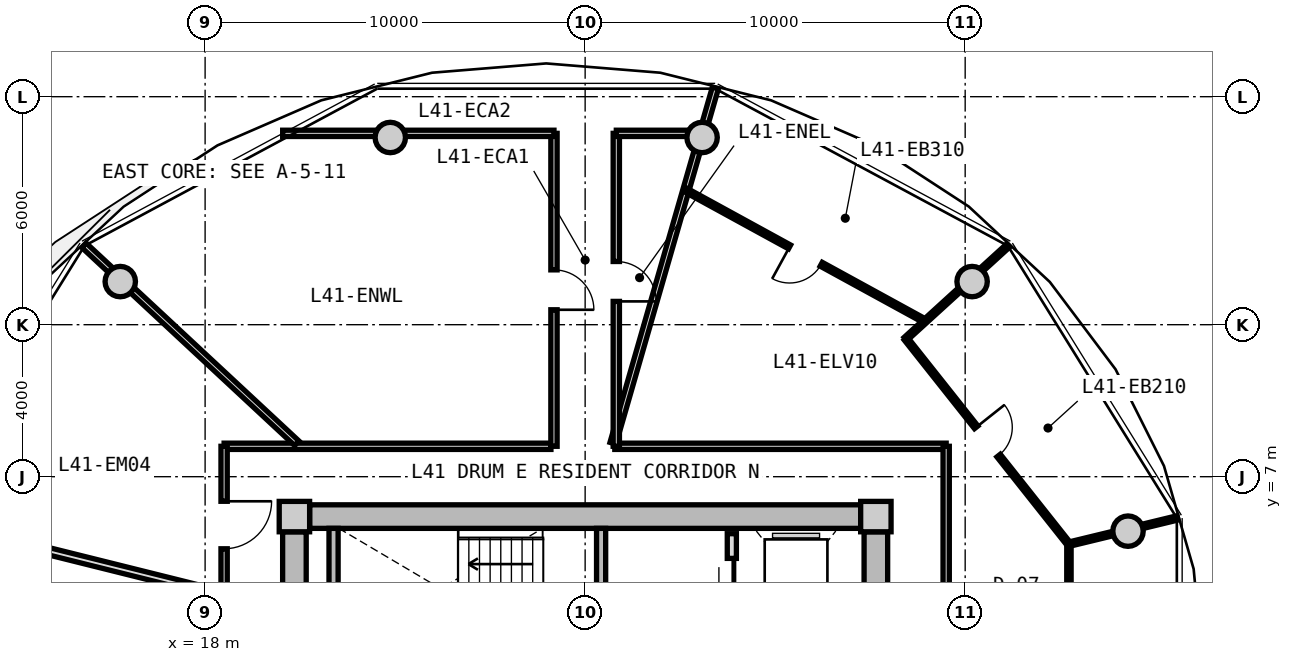
"""IFC4 building model, lengths in metres.
Left out: names, types, materials, properties, quantities, classifications, styles, units other than length and angle.
Written with IfcOpenShell. Run it as: python <this file> out.ifc"""

import sys

from ifc_helpers import new_model, si_unit, direction, frame, frame_2d, origin, origin_2d, place, context, subcontext, project, spatial, rectangle, circle, extrude, source, transform, mapped, element, fill, save


model = new_model("IFC4")
c1 = context("Model", 3, precision=1e-05, world=origin(), true_north=direction((0.0, 1.0)))
c2 = subcontext(c1, "Body", "Model", "MODEL_VIEW")
j1 = project(units=[si_unit("LENGTHUNIT", "METRE"), si_unit("PLANEANGLEUNIT", "RADIAN")], contexts=[c1])
p1 = place(None, origin())
s1 = spatial("IfcSite", under=j1, at=p1, CompositionType="ELEMENT")
p2 = place(p1, origin())
s2 = spatial("IfcBuilding", under=s1, at=p2, CompositionType="ELEMENT")
p3 = place(p2, frame((0.0, 0.0, 134.3)))
s3 = spatial("IfcBuildingStorey", under=s2, at=p3, CompositionType="ELEMENT", Elevation=134.3)
m1 = source(origin(), c2, "Body", "SweptSolid", [
    extrude(rectangle(XDim=0.8, YDim=0.8, at=origin_2d()), origin(), (0.0, 0.0, 1.0), 3.05),
])
for number, where, z_axis, x_axis in (
    (1, (35.65, 5.95, 0.0), (0.0, 0.0, 1.0), (1.0, 0.0, 0.0)),
    (2, (20.35, 5.95, 0.0), (0.0, 0.0, 1.0), (1.0, 0.0, 0.0)),
):
    element("IfcColumn", number, at=place(p3, frame(where, z_axis=z_axis, x_axis=x_axis)), inside=s3, PredefinedType="COLUMN", context=c2, shape_type="MappedRepresentation", body=[
        mapped(m1, transform((0.0, 0.0, 0.0), x_axis=(1.0, 0.0, 0.0), y_axis=(0.0, 1.0, 0.0), z_axis=(0.0, 0.0, 1.0), scale=1.0)),
    ])
m2 = source(origin(), c2, "Body", "SweptSolid", [
    extrude(rectangle(XDim=14.5, YDim=0.62, at=frame_2d((7.25, 0.0))), origin(), (0.0, 0.0, 1.0), 2.81),
])
p4 = place(p3, frame((20.75, 5.95, 0.0), z_axis=(0.0, 0.0, 1.0), x_axis=(1.0, 0.0, 0.0)))
e3 = element("IfcWall", 3, at=p4, inside=s3, PredefinedType="SHEAR", context=c2, shape_type="MappedRepresentation", body=[
    mapped(m2, transform((0.0, 0.0, 0.0), x_axis=(1.0, 0.0, 0.0), y_axis=(0.0, 1.0, 0.0), z_axis=(0.0, 0.0, 1.0), scale=1.0)),
])
m3 = source(origin(), c2, "Body", "SweptSolid", [
    extrude(rectangle(XDim=11.1, YDim=0.62, at=frame_2d((5.55, 0.0))), origin(), (0.0, 0.0, 1.0), 2.81),
])
p5 = place(p3, frame((20.35, -5.55, 0.0), z_axis=(0.0, 0.0, 1.0), x_axis=(0.0, 1.0, 0.0)))
e4 = element("IfcWall", 4, at=p5, inside=s3, PredefinedType="SHEAR", context=c2, shape_type="MappedRepresentation", body=[
    mapped(m3, transform((0.0, 0.0, 0.0), x_axis=(1.0, 0.0, 0.0), y_axis=(0.0, 1.0, 0.0), z_axis=(0.0, 0.0, 1.0), scale=1.0)),
])
p6 = place(p5, frame((3.8, 0.0, 0.0)))
e5 = element("IfcOpeningElement", 5, at=p6, cuts=e4, PredefinedType="OPENING", context=c2, shape_type="SweptSolid", body=[
    extrude(rectangle(XDim=1.2, YDim=2.15, at=frame_2d((0.6, 1.075))), frame((0.0, 0.32, 0.0), z_axis=(0.0, -1.0, 0.0), x_axis=(1.0, 0.0, 0.0)), (0.0, 0.0, 1.0), 0.64),
])
p7 = place(p3, frame((35.65, 5.55, 0.0), z_axis=(0.0, 0.0, 1.0), x_axis=(0.0, -1.0, 0.0)))
e6 = element("IfcWall", 6, at=p7, inside=s3, PredefinedType="SHEAR", context=c2, shape_type="MappedRepresentation", body=[
    mapped(m3, transform((0.0, 0.0, 0.0), x_axis=(1.0, 0.0, 0.0), y_axis=(0.0, 1.0, 0.0), z_axis=(0.0, 0.0, 1.0), scale=1.0)),
])
p8 = place(p7, frame((5.65, 0.0, 0.0)))
e7 = element("IfcOpeningElement", 7, at=p8, cuts=e6, PredefinedType="OPENING", context=c2, shape_type="SweptSolid", body=[
    extrude(rectangle(XDim=1.2, YDim=2.15, at=frame_2d((0.6, 1.075))), frame((0.0, 0.32, 0.0), z_axis=(0.0, -1.0, 0.0), x_axis=(1.0, 0.0, 0.0)), (0.0, 0.0, 1.0), 0.64),
])
p9 = place(p7, frame((9.3, 0.0, 0.0)))
e8 = element("IfcOpeningElement", 8, at=p9, cuts=e6, PredefinedType="OPENING", context=c2, shape_type="SweptSolid", body=[
    extrude(rectangle(XDim=1.0, YDim=2.1, at=frame_2d((0.5, 1.05))), frame((0.0, 0.32, 0.0), z_axis=(0.0, -1.0, 0.0), x_axis=(1.0, 0.0, 0.0)), (0.0, 0.0, 1.0), 0.64),
])
m4 = source(origin(), c2, "Body", "SweptSolid", [
    extrude(circle(Radius=0.4, at=origin_2d()), origin(), (0.0, 0.0, 1.0), 3.47),
])
for number, where, z_axis, x_axis in (
    (9, (42.285, 5.567, -0.42), (0.0, 0.0, 1.0), (1.0, 0.0, 0.0)),
    (10, (38.183, 12.135, -0.42), (0.0, 0.0, 1.0), (1.0, 0.0, 0.0)),
    (11, (31.077, 15.926, -0.42), (0.0, 0.0, 1.0), (1.0, 0.0, 0.0)),
    (12, (22.873, 15.926, -0.42), (0.0, 0.0, 1.0), (1.0, 0.0, 0.0)),
    (13, (15.767, 12.135, -0.42), (0.0, 0.0, 1.0), (1.0, 0.0, 0.0)),
):
    element("IfcColumn", number, at=place(p3, frame(where, z_axis=z_axis, x_axis=x_axis)), inside=s3, PredefinedType="COLUMN", context=c2, shape_type="MappedRepresentation", body=[
        mapped(m4, transform((0.0, 0.0, 0.0), x_axis=(1.0, 0.0, 0.0), y_axis=(0.0, 1.0, 0.0), z_axis=(0.0, 0.0, 1.0), scale=1.0)),
    ])
m5 = source(origin(), c2, "Body", "SweptSolid", [
    extrude(rectangle(XDim=3.19, YDim=0.24, at=frame_2d((1.595, 0.0))), origin(), (0.0, 0.0, 1.0), 2.81),
])
p10 = place(p3, frame((21.38, 2.45, 0.0), z_axis=(0.0, 0.0, 1.0), x_axis=(0.0, 1.0, 0.0)))
e14 = element("IfcWall", 14, at=p10, inside=s3, PredefinedType="PARTITIONING", context=c2, shape_type="MappedRepresentation", body=[
    mapped(m5, transform((0.0, 0.0, 0.0), x_axis=(1.0, 0.0, 0.0), y_axis=(0.0, 1.0, 0.0), z_axis=(0.0, 0.0, 1.0), scale=1.0)),
])
p11 = place(p3, frame((28.42, 2.45, 0.0), z_axis=(0.0, 0.0, 1.0), x_axis=(0.0, 1.0, 0.0)))
e15 = element("IfcWall", 15, at=p11, inside=s3, PredefinedType="PARTITIONING", context=c2, shape_type="MappedRepresentation", body=[
    mapped(m5, transform((0.0, 0.0, 0.0), x_axis=(1.0, 0.0, 0.0), y_axis=(0.0, 1.0, 0.0), z_axis=(0.0, 0.0, 1.0), scale=1.0)),
])
p12 = place(p11, frame((0.55, 0.0, 0.0)))
e16 = element("IfcOpeningElement", 16, at=p12, cuts=e15, PredefinedType="OPENING", context=c2, shape_type="SweptSolid", body=[
    extrude(rectangle(XDim=1.1, YDim=2.15, at=frame_2d((0.55, 1.075))), frame((0.0, 0.13, 0.0), z_axis=(0.0, -1.0, 0.0), x_axis=(1.0, 0.0, 0.0)), (0.0, 0.0, 1.0), 0.26),
])
m6 = source(origin(), c2, "Body", "SweptSolid", [
    extrude(rectangle(XDim=5.0, YDim=0.24, at=frame_2d((2.5, 0.0))), origin(), (0.0, 0.0, 1.0), 2.795),
])
p13 = place(p3, frame((31.86, 0.5, 0.0), z_axis=(0.0, 0.0, 1.0), x_axis=(0.0, 1.0, 0.0)))
e17 = element("IfcWall", 17, at=p13, inside=s3, PredefinedType="PARTITIONING", context=c2, shape_type="MappedRepresentation", body=[
    mapped(m6, transform((0.0, 0.0, 0.0), x_axis=(1.0, 0.0, 0.0), y_axis=(0.0, 1.0, 0.0), z_axis=(0.0, 0.0, 1.0), scale=1.0)),
])
p14 = place(p13, frame((3.05, 0.0, 0.0)))
e18 = element("IfcOpeningElement", 18, at=p14, cuts=e17, PredefinedType="OPENING", context=c2, shape_type="SweptSolid", body=[
    extrude(rectangle(XDim=1.3, YDim=2.2, at=frame_2d((0.65, 1.1))), frame((0.0, 0.13, 0.0), z_axis=(0.0, -1.0, 0.0), x_axis=(1.0, 0.0, 0.0)), (0.0, 0.0, 1.0), 0.26),
])
p15 = place(p13, frame((0.55, 0.0, 0.0)))
e19 = element("IfcOpeningElement", 19, at=p15, cuts=e17, PredefinedType="OPENING", context=c2, shape_type="SweptSolid", body=[
    extrude(rectangle(XDim=1.3, YDim=2.2, at=frame_2d((0.65, 1.1))), frame((0.0, 0.13, 0.0), z_axis=(0.0, -1.0, 0.0), x_axis=(1.0, 0.0, 0.0)), (0.0, 0.0, 1.0), 0.26),
])
m7 = source(origin(), c2, "Body", "SweptSolid", [
    extrude(rectangle(XDim=8.6, YDim=0.165, at=frame_2d((4.3, 0.0))), origin(), (0.0, 0.0, 1.0), 2.795),
])
p16 = place(p3, frame((18.5, 7.8, 0.0), z_axis=(0.0, 0.0, 1.0), x_axis=(1.0, 0.0, 0.0)))
e20 = element("IfcWall", 20, at=p16, inside=s3, PredefinedType="PARTITIONING", context=c2, shape_type="MappedRepresentation", body=[
    mapped(m7, transform((0.0, 0.0, 0.0), x_axis=(1.0, 0.0, 0.0), y_axis=(0.0, 1.0, 0.0), z_axis=(0.0, 0.0, 1.0), scale=1.0)),
])
m8 = source(origin(), c2, "Body", "SweptSolid", [
    extrude(rectangle(XDim=8.719, YDim=0.165, at=frame_2d((4.36, 0.0))), origin(), (0.0, 0.0, 1.0), 2.795),
])
p17 = place(p3, frame((28.781, 7.8, 0.0), z_axis=(0.0, 0.0, 1.0), x_axis=(1.0, 0.0, 0.0)))
e21 = element("IfcWall", 21, at=p17, inside=s3, PredefinedType="PARTITIONING", context=c2, shape_type="MappedRepresentation", body=[
    mapped(m8, transform((0.0, 0.0, 0.0), x_axis=(1.0, 0.0, 0.0), y_axis=(0.0, 1.0, 0.0), z_axis=(0.0, 0.0, 1.0), scale=1.0)),
])
m9 = source(origin(), c2, "Body", "SweptSolid", [
    extrude(rectangle(XDim=15.6, YDim=0.165, at=frame_2d((7.8, 0.0))), origin(), (0.0, 0.0, 1.0), 2.795),
])
p18 = place(p3, frame((18.5, -7.8, 0.0), z_axis=(0.0, 0.0, 1.0), x_axis=(0.0, 1.0, 0.0)))
e22 = element("IfcWall", 22, at=p18, inside=s3, PredefinedType="PARTITIONING", context=c2, shape_type="MappedRepresentation", body=[
    mapped(m9, transform((0.0, 0.0, 0.0), x_axis=(1.0, 0.0, 0.0), y_axis=(0.0, 1.0, 0.0), z_axis=(0.0, 0.0, 1.0), scale=1.0)),
])
p19 = place(p18, frame((12.903, 0.0, 0.0)))
e23 = element("IfcOpeningElement", 23, at=p19, cuts=e22, PredefinedType="OPENING", context=c2, shape_type="SweptSolid", body=[
    extrude(rectangle(XDim=1.25, YDim=2.2, at=frame_2d((0.625, 1.1))), frame((0.0, 0.093, 0.0), z_axis=(0.0, -1.0, 0.0), x_axis=(1.0, 0.0, 0.0)), (0.0, 0.0, 1.0), 0.185),
])
p20 = place(p18, frame((8.95, 0.0, 0.0)))
e24 = element("IfcOpeningElement", 24, at=p20, cuts=e22, PredefinedType="OPENING", context=c2, shape_type="SweptSolid", body=[
    extrude(rectangle(XDim=1.25, YDim=2.2, at=frame_2d((0.625, 1.1))), frame((0.0, 0.093, 0.0), z_axis=(0.0, -1.0, 0.0), x_axis=(1.0, 0.0, 0.0)), (0.0, 0.0, 1.0), 0.185),
])
p21 = place(p3, frame((37.5, 7.8, 0.0), z_axis=(0.0, 0.0, 1.0), x_axis=(0.0, -1.0, 0.0)))
e25 = element("IfcWall", 25, at=p21, inside=s3, PredefinedType="PARTITIONING", context=c2, shape_type="MappedRepresentation", body=[
    mapped(m9, transform((0.0, 0.0, 0.0), x_axis=(1.0, 0.0, 0.0), y_axis=(0.0, 1.0, 0.0), z_axis=(0.0, 0.0, 1.0), scale=1.0)),
])
p22 = place(p21, frame((5.687, 0.0, 0.0)))
e26 = element("IfcOpeningElement", 26, at=p22, cuts=e25, PredefinedType="OPENING", context=c2, shape_type="SweptSolid", body=[
    extrude(rectangle(XDim=1.05, YDim=2.15, at=frame_2d((0.525, 1.075))), frame((0.0, 0.093, 0.0), z_axis=(0.0, -1.0, 0.0), x_axis=(1.0, 0.0, 0.0)), (0.0, 0.0, 1.0), 0.185),
])
m10 = source(origin(), c2, "Body", "SweptSolid", [
    extrude(rectangle(XDim=9.73, YDim=0.165, at=frame_2d((4.865, 0.0))), origin(), (0.0, 0.0, 1.0), 2.345),
])
p23 = place(p3, frame((28.733, 7.88, 0.0), z_axis=(0.0, 0.0, 1.0), x_axis=(0.27679492614, 0.960929013436, 0.0)))
e27 = element("IfcWall", 27, at=p23, inside=s3, PredefinedType="PARTITIONING", context=c2, shape_type="MappedRepresentation", body=[
    mapped(m10, transform((0.0, 0.0, 0.0), x_axis=(1.0, 0.0, 0.0), y_axis=(0.0, 1.0, 0.0), z_axis=(0.0, 0.0, 1.0), scale=1.0)),
])
m11 = source(origin(), c2, "Body", "SweptSolid", [
    extrude(rectangle(XDim=7.648, YDim=0.165, at=frame_2d((3.824, 0.0))), origin(), (0.0, 0.0, 1.0), 2.345),
])
p24 = place(p3, frame((20.413, 7.88, 0.0), z_axis=(0.0, 0.0, 1.0), x_axis=(-0.732182665826, 0.681108320213, 0.0)))
e28 = element("IfcWall", 28, at=p24, inside=s3, PredefinedType="PARTITIONING", context=c2, shape_type="MappedRepresentation", body=[
    mapped(m11, transform((0.0, 0.0, 0.0), x_axis=(1.0, 0.0, 0.0), y_axis=(0.0, 1.0, 0.0), z_axis=(0.0, 0.0, 1.0), scale=1.0)),
])
m12 = source(origin(), c2, "Body", "SweptSolid", [
    extrude(rectangle(XDim=8.235, YDim=0.165, at=frame_2d((4.118, 0.0))), origin(), (0.0, 0.0, 1.0), 2.795),
])
p25 = place(p3, frame((27.18, 7.8, 0.0), z_axis=(0.0, 0.0, 1.0), x_axis=(0.0, 1.0, 0.0)))
e29 = element("IfcWall", 29, at=p25, inside=s3, PredefinedType="PARTITIONING", context=c2, shape_type="MappedRepresentation", body=[
    mapped(m12, transform((0.0, 0.0, 0.0), x_axis=(1.0, 0.0, 0.0), y_axis=(0.0, 1.0, 0.0), z_axis=(0.0, 0.0, 1.0), scale=1.0)),
])
p26 = place(p25, frame((3.593, 0.0, 0.0)))
e30 = element("IfcOpeningElement", 30, at=p26, cuts=e29, PredefinedType="OPENING", context=c2, shape_type="SweptSolid", body=[
    extrude(rectangle(XDim=1.05, YDim=2.15, at=frame_2d((0.525, 1.075))), frame((0.0, 0.093, 0.0), z_axis=(0.0, -1.0, 0.0), x_axis=(1.0, 0.0, 0.0)), (0.0, 0.0, 1.0), 0.185),
])
m13 = source(origin(), c2, "Body", "SweptSolid", [
    extrude(rectangle(XDim=7.139, YDim=0.165, at=frame_2d((3.569, 0.0))), origin(), (0.0, 0.0, 1.0), 2.345),
])
p27 = place(p3, frame((20.041, 16.035, 0.0), z_axis=(0.0, 0.0, 1.0), x_axis=(1.0, 0.0, 0.0)))
e31 = element("IfcWall", 31, at=p27, inside=s3, PredefinedType="PARTITIONING", context=c2, shape_type="MappedRepresentation", body=[
    mapped(m13, transform((0.0, 0.0, 0.0), x_axis=(1.0, 0.0, 0.0), y_axis=(0.0, 1.0, 0.0), z_axis=(0.0, 0.0, 1.0), scale=1.0)),
])
p28 = place(p3, frame((28.82, 7.8, 0.0), z_axis=(0.0, 0.0, 1.0), x_axis=(0.0, 1.0, 0.0)))
e32 = element("IfcWall", 32, at=p28, inside=s3, PredefinedType="PARTITIONING", context=c2, shape_type="MappedRepresentation", body=[
    mapped(m12, transform((0.0, 0.0, 0.0), x_axis=(1.0, 0.0, 0.0), y_axis=(0.0, 1.0, 0.0), z_axis=(0.0, 0.0, 1.0), scale=1.0)),
])
p29 = place(p28, frame((3.813, 0.0, 0.0)))
e33 = element("IfcOpeningElement", 33, at=p29, cuts=e32, PredefinedType="OPENING", context=c2, shape_type="SweptSolid", body=[
    extrude(rectangle(XDim=1.05, YDim=2.15, at=frame_2d((0.525, 1.075))), frame((0.0, 0.093, 0.0), z_axis=(0.0, -1.0, 0.0), x_axis=(1.0, 0.0, 0.0)), (0.0, 0.0, 1.0), 0.185),
])
m14 = source(origin(), c2, "Body", "SweptSolid", [
    extrude(rectangle(XDim=2.419, YDim=0.165, at=frame_2d((1.209, 0.0))), origin(), (0.0, 0.0, 1.0), 2.345),
])
p30 = place(p3, frame((28.82, 16.035, 0.0), z_axis=(0.0, 0.0, 1.0), x_axis=(1.0, 0.0, 0.0)))
e34 = element("IfcWall", 34, at=p30, inside=s3, PredefinedType="PARTITIONING", context=c2, shape_type="MappedRepresentation", body=[
    mapped(m14, transform((0.0, 0.0, 0.0), x_axis=(1.0, 0.0, 0.0), y_axis=(0.0, 1.0, 0.0), z_axis=(0.0, 0.0, 1.0), scale=1.0)),
])
m15 = source(origin(), c2, "Body", "SweptSolid", [
    extrude(rectangle(XDim=8.305, YDim=0.19, at=frame_2d((4.153, 0.0))), origin(), (0.0, 0.0, 1.0), 2.345),
])
p31 = place(p3, frame((18.42, 3.908, 0.0), z_axis=(0.0, 0.0, 1.0), x_axis=(-0.970309994378, 0.241864662175, 0.0)))
e35 = element("IfcWall", 35, at=p31, inside=s3, PredefinedType="PARTITIONING", context=c2, shape_type="MappedRepresentation", body=[
    mapped(m15, transform((0.0, 0.0, 0.0), x_axis=(1.0, 0.0, 0.0), y_axis=(0.0, 1.0, 0.0), z_axis=(0.0, 0.0, 1.0), scale=1.0)),
])
m16 = source(origin(), c2, "Body", "SweptSolid", [
    extrude(rectangle(XDim=6.897, YDim=0.115, at=frame_2d((3.448, 0.0))), origin(), (0.0, 0.0, 1.0), 2.795),
])
p32 = place(p3, frame((40.73, -1.673, 0.0), z_axis=(0.0, 0.0, 1.0), x_axis=(0.0, 1.0, 0.0)))
e36 = element("IfcWall", 36, at=p32, inside=s3, PredefinedType="PARTITIONING", context=c2, shape_type="MappedRepresentation", body=[
    mapped(m16, transform((0.0, 0.0, 0.0), x_axis=(1.0, 0.0, 0.0), y_axis=(0.0, 1.0, 0.0), z_axis=(0.0, 0.0, 1.0), scale=1.0)),
])
p33 = place(p32, frame((2.973, 0.0, 0.0)))
e37 = element("IfcOpeningElement", 37, at=p33, cuts=e36, PredefinedType="OPENING", context=c2, shape_type="SweptSolid", body=[
    extrude(rectangle(XDim=0.95, YDim=2.1, at=frame_2d((0.475, 1.05))), frame((0.0, 0.067, 0.0), z_axis=(0.0, -1.0, 0.0), x_axis=(1.0, 0.0, 0.0)), (0.0, 0.0, 1.0), 0.135),
])
m17 = source(origin(), c2, "Body", "SweptSolid", [
    extrude(rectangle(XDim=6.902, YDim=0.115, at=frame_2d((3.451, 0.0))), origin(), (0.0, 0.0, 1.0), 2.795),
])
p34 = place(p3, frame((40.729, 5.223, 0.0), z_axis=(0.0, 0.0, 1.0), x_axis=(-0.62123371778, 0.783625336429, 0.0)))
e38 = element("IfcWall", 38, at=p34, inside=s3, PredefinedType="PARTITIONING", context=c2, shape_type="MappedRepresentation", body=[
    mapped(m17, transform((0.0, 0.0, 0.0), x_axis=(1.0, 0.0, 0.0), y_axis=(0.0, 1.0, 0.0), z_axis=(0.0, 0.0, 1.0), scale=1.0)),
])
p35 = place(p34, frame((2.976, 0.0, 0.0)))
e39 = element("IfcOpeningElement", 39, at=p35, cuts=e38, PredefinedType="OPENING", context=c2, shape_type="SweptSolid", body=[
    extrude(rectangle(XDim=0.95, YDim=2.1, at=frame_2d((0.475, 1.05))), frame((0.0, 0.067, 0.0), z_axis=(0.0, -1.0, 0.0), x_axis=(1.0, 0.0, 0.0)), (0.0, 0.0, 1.0), 0.135),
])
m18 = source(origin(), c2, "Body", "SweptSolid", [
    extrude(rectangle(XDim=2.943, YDim=0.115, at=frame_2d((1.471, 0.0))), origin(), (0.0, 0.0, 1.0), 2.345),
])
p36 = place(p3, frame((40.729, 5.223, 0.0), z_axis=(0.0, 0.0, 1.0), x_axis=(0.971864495214, 0.235540660911, 0.0)))
e40 = element("IfcWall", 40, at=p36, inside=s3, PredefinedType="PARTITIONING", context=c2, shape_type="MappedRepresentation", body=[
    mapped(m18, transform((0.0, 0.0, 0.0), x_axis=(1.0, 0.0, 0.0), y_axis=(0.0, 1.0, 0.0), z_axis=(0.0, 0.0, 1.0), scale=1.0)),
])
m19 = source(origin(), c2, "Body", "SweptSolid", [
    extrude(rectangle(XDim=7.167, YDim=0.115, at=frame_2d((3.583, 0.0))), origin(), (0.0, 0.0, 1.0), 2.795),
])
p37 = place(p3, frame((36.939, 11.098, 0.0), z_axis=(0.0, 0.0, 1.0), x_axis=(-0.8771628907, 0.480192943699, 0.0)))
e41 = element("IfcWall", 41, at=p37, inside=s3, PredefinedType="PARTITIONING", context=c2, shape_type="MappedRepresentation", body=[
    mapped(m19, transform((0.0, 0.0, 0.0), x_axis=(1.0, 0.0, 0.0), y_axis=(0.0, 1.0, 0.0), z_axis=(0.0, 0.0, 1.0), scale=1.0)),
])
p38 = place(p37, frame((3.108, 0.0, 0.0)))
e42 = element("IfcOpeningElement", 42, at=p38, cuts=e41, PredefinedType="OPENING", context=c2, shape_type="SweptSolid", body=[
    extrude(rectangle(XDim=0.95, YDim=2.1, at=frame_2d((0.475, 1.05))), frame((0.0, 0.067, 0.0), z_axis=(0.0, -1.0, 0.0), x_axis=(1.0, 0.0, 0.0)), (0.0, 0.0, 1.0), 0.135),
])
m20 = source(origin(), c2, "Body", "SweptSolid", [
    extrude(rectangle(XDim=3.66, YDim=0.115, at=frame_2d((1.83, 0.0))), origin(), (0.0, 0.0, 1.0), 2.345),
])
p39 = place(p3, frame((36.432, 10.624, 0.0), z_axis=(0.0, 0.0, 1.0), x_axis=(0.73909744987, 0.673598515137, 0.0)))
e43 = element("IfcWall", 43, at=p39, inside=s3, PredefinedType="PARTITIONING", context=c2, shape_type="MappedRepresentation", body=[
    mapped(m20, transform((0.0, 0.0, 0.0), x_axis=(1.0, 0.0, 0.0), y_axis=(0.0, 1.0, 0.0), z_axis=(0.0, 0.0, 1.0), scale=1.0)),
])
m21 = source(origin(), c2, "Body", "SweptSolid", [
    extrude(rectangle(XDim=1.3, YDim=2.2, at=frame_2d((0.65, 1.1))), frame((0.0, 0.025, 0.0), z_axis=(0.0, -1.0, 0.0), x_axis=(1.0, 0.0, 0.0)), (0.0, 0.0, 1.0), 0.05),
])
p40 = place(p14, origin())
e44 = element("IfcDoor", 44, at=p40, inside=s3, OperationType="SLIDING_TO_LEFT", PredefinedType="DOOR", context=c2, shape_type="MappedRepresentation", body=[
    mapped(m21, transform((0.0, 0.0, 0.0), x_axis=(1.0, 0.0, 0.0), y_axis=(0.0, 1.0, 0.0), z_axis=(0.0, 0.0, 1.0), scale=1.0)),
])
fill(e18, e44)
m22 = source(origin(), c2, "Body", "SweptSolid", [
    extrude(rectangle(XDim=1.05, YDim=2.15, at=frame_2d((0.525, 1.075))), frame((0.0, 0.025, 0.0), z_axis=(0.0, -1.0, 0.0), x_axis=(1.0, 0.0, 0.0)), (0.0, 0.0, 1.0), 0.05),
])
p41 = place(p26, frame((1.05, 0.0, 0.0), z_axis=(0.0, 0.0, 1.0), x_axis=(-1.0, 0.0, 0.0)))
e45 = element("IfcDoor", 45, at=p41, inside=s3, OperationType="SINGLE_SWING_RIGHT", PredefinedType="DOOR", context=c2, shape_type="MappedRepresentation", body=[
    mapped(m22, transform((0.0, 0.0, 0.0), x_axis=(1.0, 0.0, 0.0), y_axis=(0.0, 1.0, 0.0), z_axis=(0.0, 0.0, 1.0), scale=1.0)),
])
fill(e30, e45)
p42 = place(p29, frame((1.05, 0.0, 0.0), z_axis=(0.0, 0.0, 1.0), x_axis=(-1.0, 0.0, 0.0)))
e46 = element("IfcDoor", 46, at=p42, inside=s3, OperationType="SINGLE_SWING_RIGHT", PredefinedType="DOOR", context=c2, shape_type="MappedRepresentation", body=[
    mapped(m22, transform((0.0, 0.0, 0.0), x_axis=(1.0, 0.0, 0.0), y_axis=(0.0, 1.0, 0.0), z_axis=(0.0, 0.0, 1.0), scale=1.0)),
])
fill(e33, e46)
m23 = source(origin(), c2, "Body", "SweptSolid", [
    extrude(rectangle(XDim=1.25, YDim=2.2, at=frame_2d((0.625, 1.1))), frame((0.0, 0.025, 0.0), z_axis=(0.0, -1.0, 0.0), x_axis=(1.0, 0.0, 0.0)), (0.0, 0.0, 1.0), 0.05),
])
p43 = place(p19, frame((1.25, 0.0, 0.0), z_axis=(0.0, 0.0, 1.0), x_axis=(-1.0, 0.0, 0.0)))
e47 = element("IfcDoor", 47, at=p43, inside=s3, OperationType="SINGLE_SWING_LEFT", PredefinedType="DOOR", context=c2, shape_type="MappedRepresentation", body=[
    mapped(m23, transform((0.0, 0.0, 0.0), x_axis=(1.0, 0.0, 0.0), y_axis=(0.0, 1.0, 0.0), z_axis=(0.0, 0.0, 1.0), scale=1.0)),
])
fill(e23, e47)
m24 = source(origin(), c2, "Body", "SweptSolid", [
    extrude(rectangle(XDim=0.95, YDim=2.1, at=frame_2d((0.475, 1.05))), frame((0.0, 0.025, 0.0), z_axis=(0.0, -1.0, 0.0), x_axis=(1.0, 0.0, 0.0)), (0.0, 0.0, 1.0), 0.05),
])
p44 = place(p35, frame((0.95, 0.0, 0.0), z_axis=(0.0, 0.0, 1.0), x_axis=(-1.0, 0.0, 0.0)))
e48 = element("IfcDoor", 48, at=p44, inside=s3, OperationType="SINGLE_SWING_LEFT", PredefinedType="DOOR", context=c2, shape_type="MappedRepresentation", body=[
    mapped(m24, transform((0.0, 0.0, 0.0), x_axis=(1.0, 0.0, 0.0), y_axis=(0.0, 1.0, 0.0), z_axis=(0.0, 0.0, 1.0), scale=1.0)),
])
fill(e39, e48)
p45 = place(p38, origin())
e49 = element("IfcDoor", 49, at=p45, inside=s3, OperationType="SINGLE_SWING_RIGHT", PredefinedType="DOOR", context=c2, shape_type="MappedRepresentation", body=[
    mapped(m24, transform((0.0, 0.0, 0.0), x_axis=(1.0, 0.0, 0.0), y_axis=(0.0, 1.0, 0.0), z_axis=(0.0, 0.0, 1.0), scale=1.0)),
])
fill(e42, e49)
save(model, sys.argv[1])
